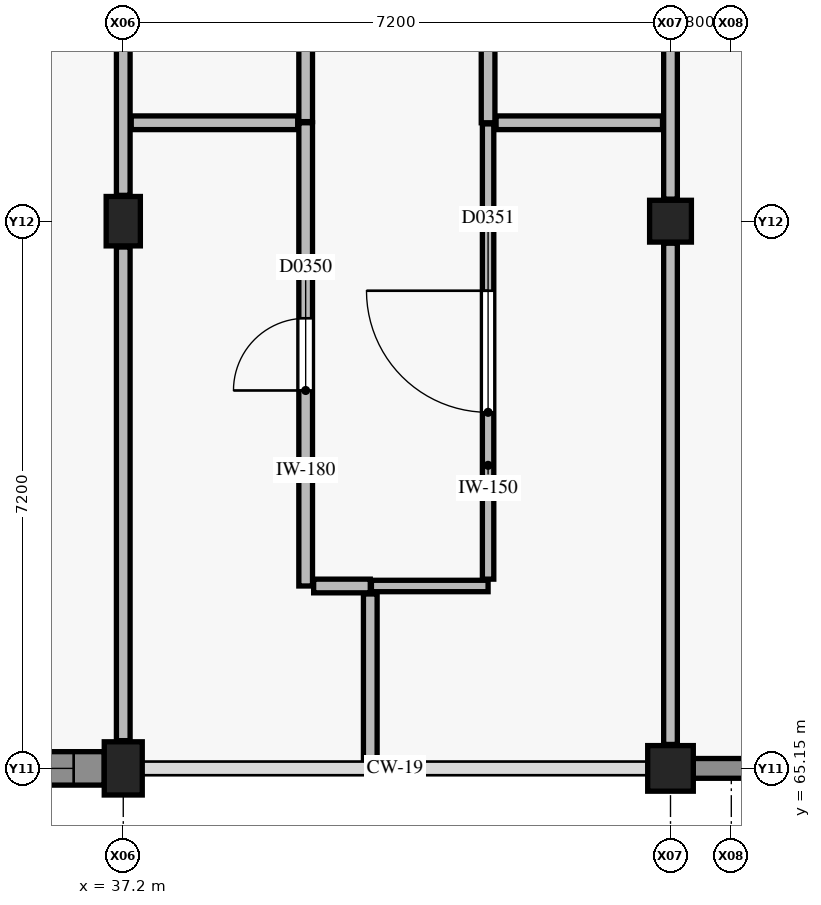
"""IFC4 building model, lengths in metres.
Left out: names, types, materials, properties, quantities, classifications, styles, units other than length and angle.
Written with IfcOpenShell. Run it as: python <this file> out.ifc"""

import sys

from ifc_helpers import new_model, si_unit, direction, frame, frame_2d, origin, origin_2d, place, context, subcontext, project, spatial, rectangle, extrude, element, fill, save


model = new_model("IFC4")
c1 = context("Model", 3, precision=1e-05, world=origin(), true_north=direction((0.0, 1.0)))
c2 = subcontext(c1, "Body", "Model", "MODEL_VIEW")
j1 = project(units=[si_unit("LENGTHUNIT", "METRE"), si_unit("PLANEANGLEUNIT", "RADIAN")], contexts=[c1])
p1 = place(None, origin())
s1 = spatial("IfcSite", under=j1, at=p1, CompositionType="ELEMENT")
p2 = place(p1, origin())
s2 = spatial("IfcBuilding", under=s1, at=p2, CompositionType="ELEMENT")
p3 = place(p2, frame((0.0, 0.0, 4.8)))
s3 = spatial("IfcBuildingStorey", under=s2, at=p3, CompositionType="ELEMENT", Elevation=4.8)
p4 = place(p3, frame((37.2, 65.15, 0.0), z_axis=(0.0, 0.0, 1.0), x_axis=(1.0, 0.0, 0.0)))
e1 = element("IfcColumn", 1, at=p4, inside=s3, PredefinedType="COLUMN", context=c2, shape_type="SweptSolid", body=[
    extrude(rectangle(XDim=0.5, YDim=0.7, at=origin_2d()), origin(), (0.0, 0.0, 1.0), 4.2),
])
p5 = place(p3, frame((37.2, 72.35, 0.0), z_axis=(0.0, 0.0, 1.0), x_axis=(1.0, 0.0, 0.0)))
e2 = element("IfcColumn", 2, at=p5, inside=s3, PredefinedType="COLUMN", context=c2, shape_type="SweptSolid", body=[
    extrude(rectangle(XDim=0.45, YDim=0.65, at=origin_2d()), origin(), (0.0, 0.0, 1.0), 4.2),
])
p6 = place(p3, frame((44.4, 65.15, 0.0), z_axis=(0.0, 0.0, 1.0), x_axis=(1.0, 0.0, 0.0)))
e3 = element("IfcColumn", 3, at=p6, inside=s3, PredefinedType="COLUMN", context=c2, shape_type="SweptSolid", body=[
    extrude(rectangle(XDim=0.6, YDim=0.6, at=origin_2d()), origin(), (0.0, 0.0, 1.0), 4.2),
])
p7 = place(p3, frame((44.4, 72.35, 0.0), z_axis=(0.0, 0.0, 1.0), x_axis=(1.0, 0.0, 0.0)))
e4 = element("IfcColumn", 4, at=p7, inside=s3, PredefinedType="COLUMN", context=c2, shape_type="SweptSolid", body=[
    extrude(rectangle(XDim=0.55, YDim=0.55, at=origin_2d()), origin(), (0.0, 0.0, 1.0), 4.2),
])
p8 = place(p3, frame((51.3, 65.15, 0.0), z_axis=(0.0, 0.0, 1.0), x_axis=(-1.0, 0.0, 0.0)))
e5 = element("IfcWall", 5, at=p8, inside=s3, PredefinedType="SOLIDWALL", context=c2, shape_type="SweptSolid", body=[
    extrude(rectangle(XDim=6.6, YDim=0.26, at=frame_2d((3.3, 0.0))), origin(), (0.0, 0.0, 1.0), 3.13),
])
p9 = place(p8, frame((0.99, 0.0, 0.9)))
e6 = element("IfcOpeningElement", 6, at=p9, cuts=e5, PredefinedType="OPENING", context=c2, shape_type="SweptSolid", body=[
    extrude(rectangle(XDim=1.05, YDim=1.8, at=frame_2d((0.525, 0.9))), frame((0.0, 0.14, 0.0), z_axis=(0.0, -1.0, 0.0), x_axis=(1.0, 0.0, 0.0)), (0.0, 0.0, 1.0), 0.28),
])
p10 = place(p8, frame((4.235, 0.0, 0.9)))
e7 = element("IfcOpeningElement", 7, at=p10, cuts=e5, PredefinedType="OPENING", context=c2, shape_type="SweptSolid", body=[
    extrude(rectangle(XDim=1.2, YDim=1.8, at=frame_2d((0.6, 0.9))), frame((0.0, 0.14, 0.0), z_axis=(0.0, -1.0, 0.0), x_axis=(1.0, 0.0, 0.0)), (0.0, 0.0, 1.0), 0.28),
])
p11 = place(p3, frame((36.95, 65.15, 0.0), z_axis=(0.0, 0.0, 1.0), x_axis=(-1.0, 0.0, 0.0)))
e8 = element("IfcWall", 8, at=p11, inside=s3, PredefinedType="USERDEFINED", context=c2, shape_type="SweptSolid", body=[
    extrude(rectangle(XDim=6.625, YDim=0.44, at=frame_2d((3.312, 0.0))), origin(), (0.0, 0.0, 1.0), 3.13),
])
p12 = place(p11, frame((0.403, 0.0, 0.9)))
e9 = element("IfcOpeningElement", 9, at=p12, cuts=e8, PredefinedType="OPENING", context=c2, shape_type="SweptSolid", body=[
    extrude(rectangle(XDim=1.4, YDim=1.8, at=frame_2d((0.7, 0.9))), frame((0.0, 0.23, 0.0), z_axis=(0.0, -1.0, 0.0), x_axis=(1.0, 0.0, 0.0)), (0.0, 0.0, 1.0), 0.46),
])
p13 = place(p11, frame((2.9, 0.0, 0.95)))
e10 = element("IfcOpeningElement", 10, at=p13, cuts=e8, PredefinedType="OPENING", context=c2, shape_type="SweptSolid", body=[
    extrude(rectangle(XDim=0.9, YDim=1.2, at=frame_2d((0.45, 0.6))), frame((0.0, 0.23, 0.0), z_axis=(0.0, -1.0, 0.0), x_axis=(1.0, 0.0, 0.0)), (0.0, 0.0, 1.0), 0.46),
])
p14 = place(p3, frame((39.6, 67.55, 0.0), z_axis=(0.0, 0.0, 1.0), x_axis=(0.0, 1.0, 0.0)))
e11 = element("IfcWall", 11, at=p14, inside=s3, PredefinedType="PLUMBINGWALL", context=c2, shape_type="SweptSolid", body=[
    extrude(rectangle(XDim=6.095, YDim=0.18, at=frame_2d((3.047, 0.0))), origin(), (0.0, 0.0, 1.0), 3.235),
])
p15 = place(p14, frame((2.573, 0.0, 0.0)))
e12 = element("IfcOpeningElement", 12, at=p15, cuts=e11, PredefinedType="OPENING", context=c2, shape_type="SweptSolid", body=[
    extrude(rectangle(XDim=0.95, YDim=2.1, at=frame_2d((0.475, 1.05))), frame((0.0, 0.1, 0.0), z_axis=(0.0, -1.0, 0.0), x_axis=(1.0, 0.0, 0.0)), (0.0, 0.0, 1.0), 0.2),
])
p16 = place(p3, frame((39.705, 67.55, 0.0), z_axis=(0.0, 0.0, 1.0), x_axis=(1.0, 0.0, 0.0)))
e13 = element("IfcWall", 13, at=p16, inside=s3, PredefinedType="PLUMBINGWALL", context=c2, shape_type="SweptSolid", body=[
    extrude(rectangle(XDim=0.745, YDim=0.18, at=frame_2d((0.373, 0.0))), origin(), (0.0, 0.0, 1.0), 3.475),
])
p17 = place(p3, frame((39.6, 73.66, 0.0), z_axis=(0.0, 0.0, 1.0), x_axis=(0.0, 1.0, 0.0)))
e14 = element("IfcWall", 14, at=p17, inside=s3, PredefinedType="PLUMBINGWALL", context=c2, shape_type="SweptSolid", body=[
    extrude(rectangle(XDim=7.635, YDim=0.18, at=frame_2d((3.817, 0.0))), origin(), (0.0, 0.0, 1.0), 3.355),
])
p18 = place(p17, frame((3.343, 0.0, 0.0)))
e15 = element("IfcOpeningElement", 15, at=p18, cuts=e14, PredefinedType="OPENING", context=c2, shape_type="SweptSolid", body=[
    extrude(rectangle(XDim=0.95, YDim=2.1, at=frame_2d((0.475, 1.05))), frame((0.0, 0.1, 0.0), z_axis=(0.0, -1.0, 0.0), x_axis=(1.0, 0.0, 0.0)), (0.0, 0.0, 1.0), 0.2),
])
p19 = place(p3, frame((42.0, 73.645, 0.0), z_axis=(0.0, 0.0, 1.0), x_axis=(0.0, 1.0, 0.0)))
e16 = element("IfcWall", 16, at=p19, inside=s3, PredefinedType="PLUMBINGWALL", context=c2, shape_type="SweptSolid", body=[
    extrude(rectangle(XDim=7.755, YDim=0.18, at=frame_2d((3.877, 0.0))), origin(), (0.0, 0.0, 1.0), 3.355),
])
p20 = place(p19, frame((3.403, 0.0, 0.0)))
e17 = element("IfcOpeningElement", 17, at=p20, cuts=e16, PredefinedType="OPENING", context=c2, shape_type="SweptSolid", body=[
    extrude(rectangle(XDim=0.95, YDim=2.1, at=frame_2d((0.475, 1.05))), frame((0.0, 0.1, 0.0), z_axis=(0.0, -1.0, 0.0), x_axis=(1.0, 0.0, 0.0)), (0.0, 0.0, 1.0), 0.2),
])
p21 = place(p3, frame((40.465, 67.55, 0.0), z_axis=(0.0, 0.0, 1.0), x_axis=(1.0, 0.0, 0.0)))
e18 = element("IfcWall", 18, at=p21, inside=s3, PredefinedType="PARTITIONING", context=c2, shape_type="SweptSolid", body=[
    extrude(rectangle(XDim=1.535, YDim=0.15, at=frame_2d((0.768, 0.0))), origin(), (0.0, 0.0, 1.0), 3.475),
])
p22 = place(p3, frame((42.0, 67.64, 0.0), z_axis=(0.0, 0.0, 1.0), x_axis=(0.0, 1.0, 0.0)))
e19 = element("IfcWall", 19, at=p22, inside=s3, PredefinedType="PARTITIONING", context=c2, shape_type="SweptSolid", body=[
    extrude(rectangle(XDim=5.99, YDim=0.15, at=frame_2d((2.995, 0.0))), origin(), (0.0, 0.0, 1.0), 3.235),
])
p23 = place(p22, frame((2.195, 0.0, 0.0)))
e20 = element("IfcOpeningElement", 20, at=p23, cuts=e19, PredefinedType="OPENING", context=c2, shape_type="SweptSolid", body=[
    extrude(rectangle(XDim=1.6, YDim=2.25, at=frame_2d((0.8, 1.125))), frame((0.0, 0.085, 0.0), z_axis=(0.0, -1.0, 0.0), x_axis=(1.0, 0.0, 0.0)), (0.0, 0.0, 1.0), 0.17),
])
p24 = place(p3, frame((37.2, 65.515, 0.0), z_axis=(0.0, 0.0, 1.0), x_axis=(0.0, 1.0, 0.0)))
e21 = element("IfcWall", 21, at=p24, inside=s3, PredefinedType="PLUMBINGWALL", context=c2, shape_type="SweptSolid", body=[
    extrude(rectangle(XDim=6.495, YDim=0.18, at=frame_2d((3.248, 0.0))), origin(), (0.0, 0.0, 1.0), 3.385),
])
p25 = place(p3, frame((37.2, 72.69, 0.0), z_axis=(0.0, 0.0, 1.0), x_axis=(0.0, 1.0, 0.0)))
e22 = element("IfcWall", 22, at=p25, inside=s3, PredefinedType="PLUMBINGWALL", context=c2, shape_type="SweptSolid", body=[
    extrude(rectangle(XDim=6.545, YDim=0.18, at=frame_2d((3.272, 0.0))), origin(), (0.0, 0.0, 1.0), 3.135),
])
p26 = place(p3, frame((40.45, 65.255, 0.0), z_axis=(0.0, 0.0, 1.0), x_axis=(0.0, 1.0, 0.0)))
e23 = element("IfcWall", 23, at=p26, inside=s3, PredefinedType="PLUMBINGWALL", context=c2, shape_type="SweptSolid", body=[
    extrude(rectangle(XDim=2.19, YDim=0.18, at=frame_2d((1.095, 0.0))), origin(), (0.0, 0.0, 1.0), 3.95),
])
p27 = place(p3, frame((37.305, 73.645, 0.0), z_axis=(0.0, 0.0, 1.0), x_axis=(1.0, 0.0, 0.0)))
e24 = element("IfcWall", 24, at=p27, inside=s3, PredefinedType="PLUMBINGWALL", context=c2, shape_type="SweptSolid", body=[
    extrude(rectangle(XDim=2.19, YDim=0.18, at=frame_2d((1.095, 0.0))), origin(), (0.0, 0.0, 1.0), 3.135),
])
p28 = place(p3, frame((44.4, 65.465, 0.0), z_axis=(0.0, 0.0, 1.0), x_axis=(0.0, 1.0, 0.0)))
e25 = element("IfcWall", 25, at=p28, inside=s3, PredefinedType="PLUMBINGWALL", context=c2, shape_type="SweptSolid", body=[
    extrude(rectangle(XDim=6.595, YDim=0.18, at=frame_2d((3.297, 0.0))), origin(), (0.0, 0.0, 1.0), 3.355),
])
p29 = place(p3, frame((44.4, 72.64, 0.0), z_axis=(0.0, 0.0, 1.0), x_axis=(0.0, 1.0, 0.0)))
e26 = element("IfcWall", 26, at=p29, inside=s3, PredefinedType="PLUMBINGWALL", context=c2, shape_type="SweptSolid", body=[
    extrude(rectangle(XDim=6.645, YDim=0.18, at=frame_2d((3.323, 0.0))), origin(), (0.0, 0.0, 1.0), 3.355),
])
p30 = place(p3, frame((42.105, 73.645, 0.0), z_axis=(0.0, 0.0, 1.0), x_axis=(1.0, 0.0, 0.0)))
e27 = element("IfcWall", 27, at=p30, inside=s3, PredefinedType="PLUMBINGWALL", context=c2, shape_type="SweptSolid", body=[
    extrude(rectangle(XDim=2.19, YDim=0.18, at=frame_2d((1.095, 0.0))), origin(), (0.0, 0.0, 1.0), 3.95),
])
p31 = place(p12, origin())
e28 = element("IfcWindow", 28, at=p31, inside=s3, PartitioningType="SINGLE_PANEL", PredefinedType="WINDOW", context=c2, shape_type="SweptSolid", body=[
    extrude(rectangle(XDim=1.4, YDim=1.8, at=frame_2d((0.7, 0.9))), frame((0.0, 0.03, 0.0), z_axis=(0.0, -1.0, 0.0), x_axis=(1.0, 0.0, 0.0)), (0.0, 0.0, 1.0), 0.06),
])
fill(e9, e28)
p32 = place(p15, origin())
e29 = element("IfcDoor", 29, at=p32, inside=s3, OperationType="SINGLE_SWING_LEFT", PredefinedType="DOOR", context=c2, shape_type="SweptSolid", body=[
    extrude(rectangle(XDim=0.95, YDim=2.1, at=frame_2d((0.475, 1.05))), frame((0.0, 0.025, 0.0), z_axis=(0.0, -1.0, 0.0), x_axis=(1.0, 0.0, 0.0)), (0.0, 0.0, 1.0), 0.05),
])
fill(e12, e29)
p33 = place(p23, origin())
e30 = element("IfcDoor", 30, at=p33, inside=s3, OperationType="SINGLE_SWING_RIGHT", PredefinedType="DOOR", context=c2, shape_type="SweptSolid", body=[
    extrude(rectangle(XDim=1.6, YDim=2.25, at=frame_2d((0.8, 1.125))), frame((0.0, 0.025, 0.0), z_axis=(0.0, -1.0, 0.0), x_axis=(1.0, 0.0, 0.0)), (0.0, 0.0, 1.0), 0.05),
])
fill(e20, e30)
save(model, sys.argv[1])
